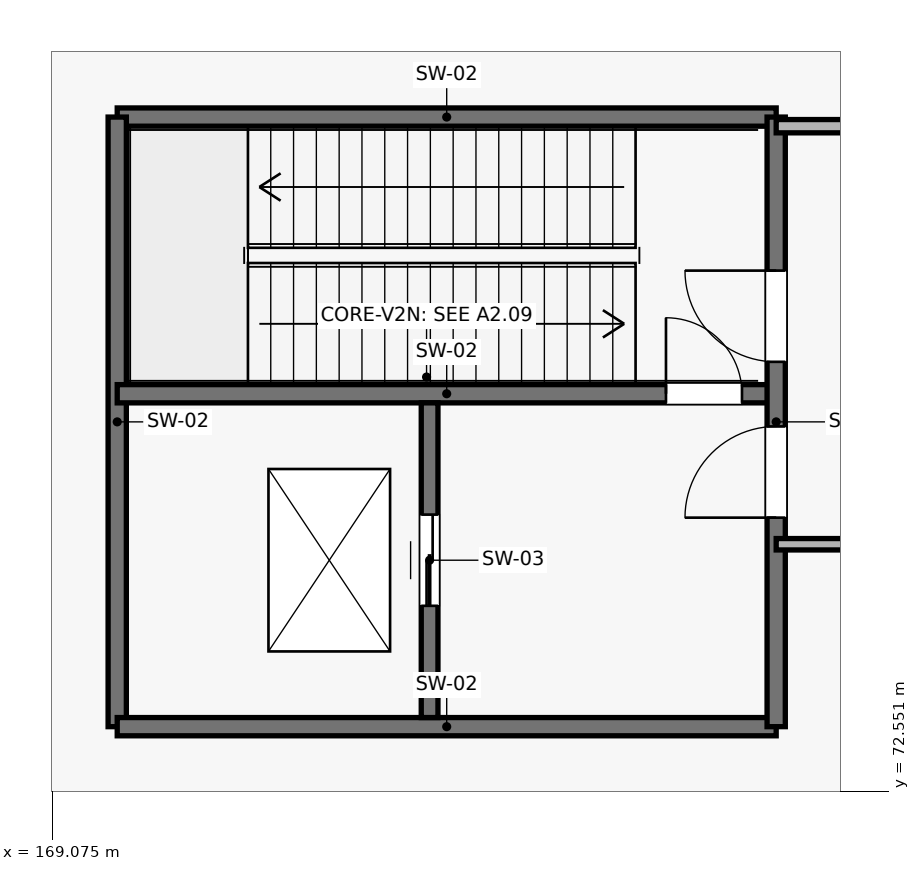
"""IFC4 building model, lengths in metres.
Left out: names, types, materials, properties, quantities, classifications, styles, units other than length and angle.
Written with IfcOpenShell. Run it as: python <this file> out.ifc"""

import sys

from ifc_helpers import new_model, si_unit, direction, frame, frame_2d, origin, place, context, subcontext, project, spatial, rectangle, extrude, element, fill, save


model = new_model("IFC4")
c1 = context("Model", 3, precision=1e-05, world=origin(), true_north=direction((0.0, 1.0)))
c2 = subcontext(c1, "Body", "Model", "MODEL_VIEW")
j1 = project(units=[si_unit("LENGTHUNIT", "METRE"), si_unit("PLANEANGLEUNIT", "RADIAN")], contexts=[c1])
p1 = place(None, origin())
s1 = spatial("IfcSite", under=j1, at=p1, CompositionType="ELEMENT")
p2 = place(p1, origin())
s2 = spatial("IfcBuilding", under=s1, at=p2, CompositionType="ELEMENT")
p3 = place(p2, origin())
s3 = spatial("IfcBuildingStorey", under=s2, at=p3, CompositionType="ELEMENT", Elevation=0.0)
p4 = place(p3, frame((178.6, 81.42, 0.0), z_axis=(0.0, 0.0, 1.0), x_axis=(-1.0, 0.0, 0.0)))
e1 = element("IfcWall", 1, at=p4, inside=s3, PredefinedType="SHEAR", context=c2, shape_type="SweptSolid", body=[
    extrude(rectangle(XDim=8.67, YDim=0.24, at=frame_2d((4.335, 0.0))), origin(), (0.0, 0.0, 1.0), 6.25),
])
p5 = place(p3, frame((169.93, 81.42, 0.0), z_axis=(0.0, 0.0, 1.0), x_axis=(0.0, -1.0, 0.0)))
e2 = element("IfcWall", 2, at=p5, inside=s3, PredefinedType="SHEAR", context=c2, shape_type="SweptSolid", body=[
    extrude(rectangle(XDim=8.02, YDim=0.24, at=frame_2d((4.01, 0.0))), origin(), (0.0, 0.0, 1.0), 6.25),
])
p6 = place(p3, frame((169.93, 73.4, 0.0), z_axis=(0.0, 0.0, 1.0), x_axis=(1.0, 0.0, 0.0)))
e3 = element("IfcWall", 3, at=p6, inside=s3, PredefinedType="SHEAR", context=c2, shape_type="SweptSolid", body=[
    extrude(rectangle(XDim=8.67, YDim=0.24, at=frame_2d((4.335, 0.0))), origin(), (0.0, 0.0, 1.0), 6.25),
])
p7 = place(p3, frame((169.93, 77.78, 0.0), z_axis=(0.0, 0.0, 1.0), x_axis=(1.0, 0.0, 0.0)))
e4 = element("IfcWall", 4, at=p7, inside=s3, PredefinedType="SHEAR", context=c2, shape_type="SweptSolid", body=[
    extrude(rectangle(XDim=8.67, YDim=0.24, at=frame_2d((4.335, 0.0))), origin(), (0.0, 0.0, 1.0), 6.25),
])
p8 = place(p7, frame((7.22, 0.0, 0.0)))
e5 = element("IfcOpeningElement", 5, at=p8, cuts=e4, PredefinedType="OPENING", context=c2, shape_type="SweptSolid", body=[
    extrude(rectangle(XDim=1.0, YDim=2.2, at=frame_2d((0.5, 1.1))), frame((0.0, 0.135, 0.0), z_axis=(0.0, -1.0, 0.0), x_axis=(1.0, 0.0, 0.0)), (0.0, 0.0, 1.0), 0.27),
])
p9 = place(p3, frame((178.6, 73.4, 0.0), z_axis=(0.0, 0.0, 1.0), x_axis=(0.0, 1.0, 0.0)))
e6 = element("IfcWall", 6, at=p9, inside=s3, PredefinedType="SHEAR", context=c2, shape_type="SweptSolid", body=[
    extrude(rectangle(XDim=8.02, YDim=0.24, at=frame_2d((4.01, 0.0))), origin(), (0.0, 0.0, 1.0), 6.25),
])
p10 = place(p9, frame((2.75, 0.0, 0.0)))
e7 = element("IfcOpeningElement", 7, at=p10, cuts=e6, PredefinedType="OPENING", context=c2, shape_type="SweptSolid", body=[
    extrude(rectangle(XDim=1.2, YDim=2.2, at=frame_2d((0.6, 1.1))), frame((0.0, 0.135, 0.0), z_axis=(0.0, -1.0, 0.0), x_axis=(1.0, 0.0, 0.0)), (0.0, 0.0, 1.0), 0.27),
])
p11 = place(p9, frame((4.8, 0.0, 0.0)))
e8 = element("IfcOpeningElement", 8, at=p11, cuts=e6, PredefinedType="OPENING", context=c2, shape_type="SweptSolid", body=[
    extrude(rectangle(XDim=1.2, YDim=2.2, at=frame_2d((0.6, 1.1))), frame((0.0, 0.135, 0.0), z_axis=(0.0, -1.0, 0.0), x_axis=(1.0, 0.0, 0.0)), (0.0, 0.0, 1.0), 0.27),
])
p12 = place(p3, frame((174.04, 73.52, 0.0), z_axis=(0.0, 0.0, 1.0), x_axis=(0.0, 1.0, 0.0)))
e9 = element("IfcWall", 9, at=p12, inside=s3, PredefinedType="SHEAR", context=c2, shape_type="SweptSolid", body=[
    extrude(rectangle(XDim=4.14, YDim=0.22, at=frame_2d((2.07, 0.0))), origin(), (0.0, 0.0, 1.0), 6.25),
])
p13 = place(p12, frame((1.47, 0.0, 0.0)))
e10 = element("IfcOpeningElement", 10, at=p13, cuts=e9, PredefinedType="OPENING", context=c2, shape_type="SweptSolid", body=[
    extrude(rectangle(XDim=1.2, YDim=2.2, at=frame_2d((0.6, 1.1))), frame((0.0, 0.125, 0.0), z_axis=(0.0, -1.0, 0.0), x_axis=(1.0, 0.0, 0.0)), (0.0, 0.0, 1.0), 0.25),
])
p14 = place(p3, frame((178.6, 75.8, 0.0), z_axis=(0.0, 0.0, 1.0), x_axis=(1.0, 0.0, 0.0)))
e11 = element("IfcWall", 11, at=p14, inside=s3, PredefinedType="PARTITIONING", context=c2, shape_type="SweptSolid", body=[
    extrude(rectangle(XDim=2.0, YDim=0.15, at=frame_2d((1.0, 0.0))), origin(), (0.0, 0.0, 1.0), 5.383),
])
p15 = place(p3, frame((178.6, 81.3, 0.0), z_axis=(0.0, 0.0, 1.0), x_axis=(1.0, 0.0, 0.0)))
e12 = element("IfcWall", 12, at=p15, inside=s3, PredefinedType="PARTITIONING", context=c2, shape_type="SweptSolid", body=[
    extrude(rectangle(XDim=5.2, YDim=0.175, at=frame_2d((2.6, 0.0))), origin(), (0.0, 0.0, 1.0), 5.383),
])
p16 = place(p15, frame((2.0, 0.0, 0.0)))
e13 = element("IfcOpeningElement", 13, at=p16, cuts=e12, PredefinedType="OPENING", context=c2, shape_type="SweptSolid", body=[
    extrude(rectangle(XDim=1.8, YDim=2.2, at=frame_2d((0.9, 1.1))), frame((0.0, 0.103, 0.0), z_axis=(0.0, -1.0, 0.0), x_axis=(1.0, 0.0, 0.0)), (0.0, 0.0, 1.0), 0.205),
])
p17 = place(p10, origin())
e14 = element("IfcDoor", 14, at=p17, inside=s3, OperationType="SINGLE_SWING_LEFT", PredefinedType="DOOR", context=c2, shape_type="SweptSolid", body=[
    extrude(rectangle(XDim=1.2, YDim=2.2, at=frame_2d((0.6, 1.1))), frame((0.0, 0.025, 0.0), z_axis=(0.0, -1.0, 0.0), x_axis=(1.0, 0.0, 0.0)), (0.0, 0.0, 1.0), 0.05),
])
fill(e7, e14)
p18 = place(p11, origin())
e15 = element("IfcDoor", 15, at=p18, inside=s3, OperationType="SINGLE_SWING_RIGHT", PredefinedType="DOOR", context=c2, shape_type="SweptSolid", body=[
    extrude(rectangle(XDim=1.2, YDim=2.2, at=frame_2d((0.6, 1.1))), frame((0.0, 0.025, 0.0), z_axis=(0.0, -1.0, 0.0), x_axis=(1.0, 0.0, 0.0)), (0.0, 0.0, 1.0), 0.05),
])
fill(e8, e15)
p19 = place(p8, origin())
e16 = element("IfcDoor", 16, at=p19, inside=s3, OperationType="SINGLE_SWING_LEFT", PredefinedType="DOOR", context=c2, shape_type="SweptSolid", body=[
    extrude(rectangle(XDim=1.0, YDim=2.2, at=frame_2d((0.5, 1.1))), frame((0.0, 0.025, 0.0), z_axis=(0.0, -1.0, 0.0), x_axis=(1.0, 0.0, 0.0)), (0.0, 0.0, 1.0), 0.05),
])
fill(e5, e16)
p20 = place(p13, origin())
e17 = element("IfcDoor", 17, at=p20, inside=s3, OperationType="DOUBLE_DOOR_SLIDING", PredefinedType="DOOR", context=c2, shape_type="SweptSolid", body=[
    extrude(rectangle(XDim=1.2, YDim=2.2, at=frame_2d((0.6, 1.1))), frame((0.0, 0.025, 0.0), z_axis=(0.0, -1.0, 0.0), x_axis=(1.0, 0.0, 0.0)), (0.0, 0.0, 1.0), 0.05),
])
fill(e10, e17)
save(model, sys.argv[1])
